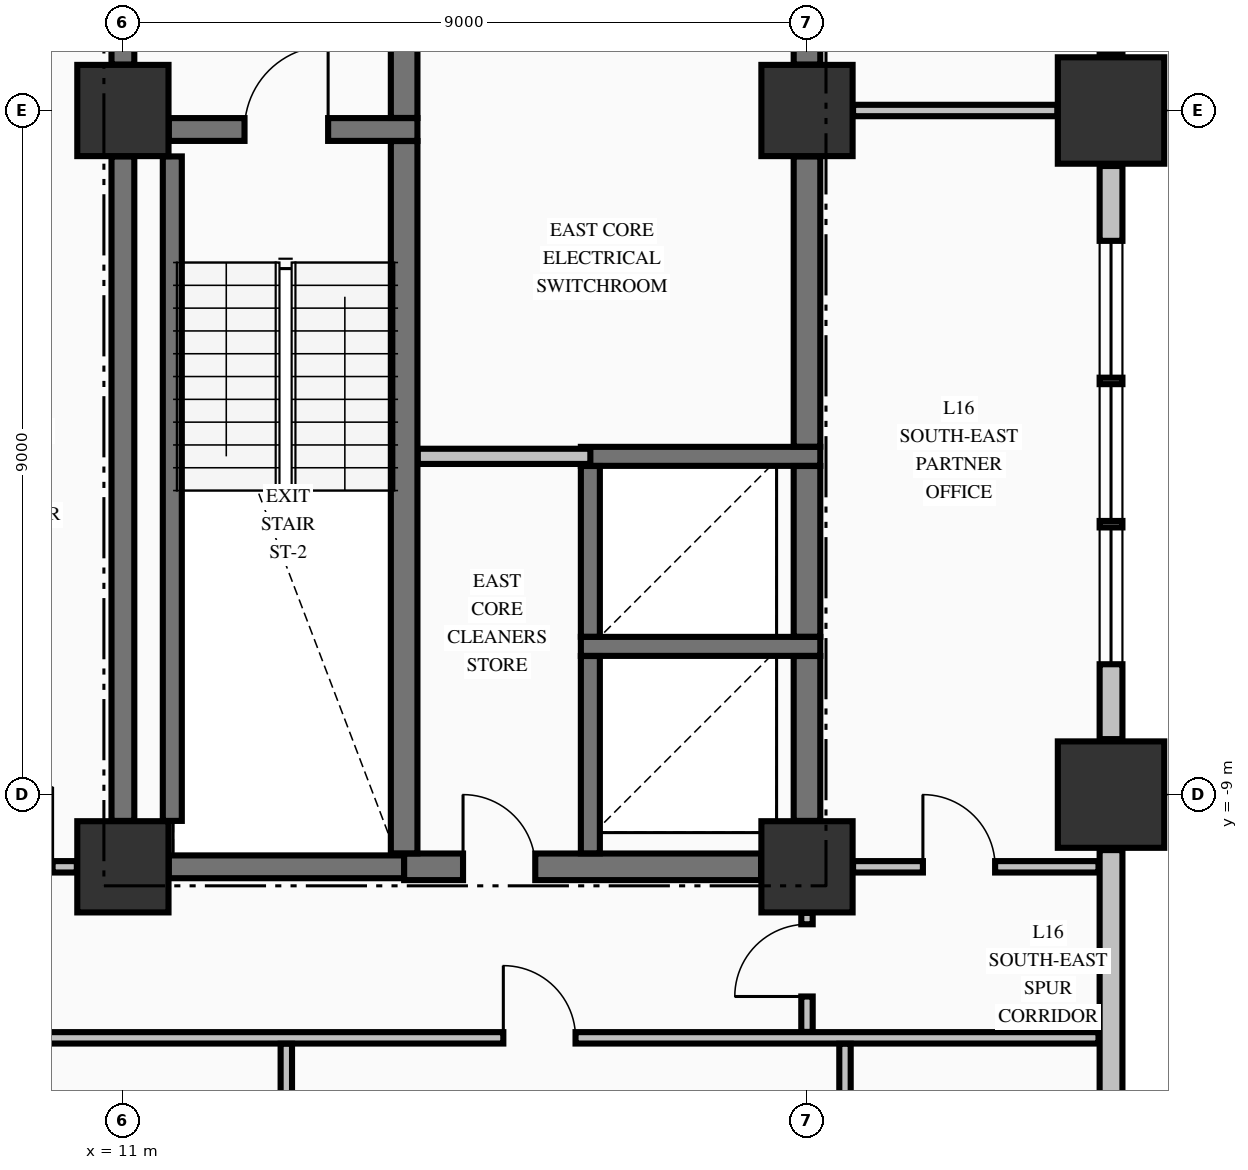
"""IFC4 building model, lengths in metres.
Left out: names, types, materials, properties, quantities, classifications, styles, units other than length and angle.
Written with IfcOpenShell. Run it as: python <this file> out.ifc"""

import sys

from ifc_helpers import new_model, si_unit, direction, frame, frame_2d, origin, origin_2d, place, context, subcontext, project, spatial, rectangle, extrude, element, fill, save


model = new_model("IFC4")
c1 = context("Model", 3, precision=1e-05, world=origin(), true_north=direction((0.0, 1.0)))
c2 = subcontext(c1, "Body", "Model", "MODEL_VIEW")
j1 = project(units=[si_unit("LENGTHUNIT", "METRE"), si_unit("PLANEANGLEUNIT", "RADIAN")], contexts=[c1])
p1 = place(None, origin())
s1 = spatial("IfcSite", under=j1, at=p1, CompositionType="ELEMENT")
p2 = place(p1, origin())
s2 = spatial("IfcBuilding", under=s1, at=p2, CompositionType="ELEMENT")
p3 = place(p2, frame((0.0, 0.0, 67.9)))
s3 = spatial("IfcBuildingStorey", under=s2, at=p3, CompositionType="ELEMENT", Elevation=67.9)
for number, where, z_axis, x_axis in (
    (1, (24.0, -9.0, -0.25), (0.0, 0.0, 1.0), (1.0, 0.0, 0.0)),
    (2, (24.0, 0.0, -0.25), (0.0, 0.0, 1.0), (1.0, 0.0, 0.0)),
):
    element("IfcColumn", number, at=place(p3, frame(where, z_axis=z_axis, x_axis=x_axis)), inside=s3, PredefinedType="COLUMN", context=c2, shape_type="SweptSolid", body=[
        extrude(rectangle(XDim=1.4, YDim=1.4, at=origin_2d()), origin(), (0.0, 0.0, 1.0), 3.495),
    ])
for number, where, z_axis, x_axis in (
    (3, (11.0, -9.95, -0.25), (0.0, 0.0, 1.0), (1.0, 0.0, 0.0)),
    (4, (11.0, 0.0, -0.25), (0.0, 0.0, 1.0), (1.0, 0.0, 0.0)),
    (5, (20.0, -9.95, -0.25), (0.0, 0.0, 1.0), (1.0, 0.0, 0.0)),
    (6, (20.0, 0.0, -0.25), (0.0, 0.0, 1.0), (1.0, 0.0, 0.0)),
):
    element("IfcColumn", number, at=place(p3, frame(where, z_axis=z_axis, x_axis=x_axis)), inside=s3, PredefinedType="COLUMN", context=c2, shape_type="SweptSolid", body=[
        extrude(rectangle(XDim=1.2, YDim=1.2, at=origin_2d()), origin(), (0.0, 0.0, 1.0), 3.495),
    ])
p4 = place(p3, frame((24.0, -22.27, 0.0), z_axis=(0.0, 0.0, 1.0), x_axis=(0.0, 1.0, 0.0)))
e7 = element("IfcWall", 7, at=p4, inside=s3, PredefinedType="STANDARD", context=c2, shape_type="SweptSolid", body=[
    extrude(rectangle(XDim=12.54, YDim=0.3, at=frame_2d((6.27, 0.0))), origin(), (0.0, 0.0, 1.0), 2.637),
])
p5 = place(p3, frame((24.0, -8.27, 0.0), z_axis=(0.0, 0.0, 1.0), x_axis=(0.0, 1.0, 0.0)))
e8 = element("IfcWall", 8, at=p5, inside=s3, PredefinedType="STANDARD", context=c2, shape_type="SweptSolid", body=[
    extrude(rectangle(XDim=7.54, YDim=0.3, at=frame_2d((3.77, 0.0))), origin(), (0.0, 0.0, 1.0), 2.637),
])
p6 = place(p5, frame((0.985, 0.0, 0.78)))
e9 = element("IfcOpeningElement", 9, at=p6, cuts=e8, PredefinedType="OPENING", context=c2, shape_type="SweptSolid", body=[
    extrude(rectangle(XDim=1.8, YDim=1.72, at=frame_2d((0.9, 0.86))), frame((0.0, 0.16, 0.0), z_axis=(0.0, -1.0, 0.0), x_axis=(1.0, 0.0, 0.0)), (0.0, 0.0, 1.0), 0.32),
])
p7 = place(p5, frame((2.87, 0.0, 0.78)))
e10 = element("IfcOpeningElement", 10, at=p7, cuts=e8, PredefinedType="OPENING", context=c2, shape_type="SweptSolid", body=[
    extrude(rectangle(XDim=1.8, YDim=1.72, at=frame_2d((0.9, 0.86))), frame((0.0, 0.16, 0.0), z_axis=(0.0, -1.0, 0.0), x_axis=(1.0, 0.0, 0.0)), (0.0, 0.0, 1.0), 0.32),
])
p8 = place(p5, frame((4.755, 0.0, 0.78)))
e11 = element("IfcOpeningElement", 11, at=p8, cuts=e8, PredefinedType="OPENING", context=c2, shape_type="SweptSolid", body=[
    extrude(rectangle(XDim=1.8, YDim=1.72, at=frame_2d((0.9, 0.86))), frame((0.0, 0.16, 0.0), z_axis=(0.0, -1.0, 0.0), x_axis=(1.0, 0.0, 0.0)), (0.0, 0.0, 1.0), 0.32),
])
p9 = place(p3, frame((24.0, 0.73, 0.0), z_axis=(0.0, 0.0, 1.0), x_axis=(0.0, 1.0, 0.0)))
e12 = element("IfcWall", 12, at=p9, inside=s3, PredefinedType="STANDARD", context=c2, shape_type="SweptSolid", body=[
    extrude(rectangle(XDim=7.54, YDim=0.3, at=frame_2d((3.77, 0.0))), origin(), (0.0, 0.0, 1.0), 2.637),
])
p10 = place(p9, frame((0.985, 0.0, 0.78)))
e13 = element("IfcOpeningElement", 13, at=p10, cuts=e12, PredefinedType="OPENING", context=c2, shape_type="SweptSolid", body=[
    extrude(rectangle(XDim=1.8, YDim=1.72, at=frame_2d((0.9, 0.86))), frame((0.0, 0.16, 0.0), z_axis=(0.0, -1.0, 0.0), x_axis=(1.0, 0.0, 0.0)), (0.0, 0.0, 1.0), 0.32),
])
p11 = place(p9, frame((2.87, 0.0, 0.78)))
e14 = element("IfcOpeningElement", 14, at=p11, cuts=e12, PredefinedType="OPENING", context=c2, shape_type="SweptSolid", body=[
    extrude(rectangle(XDim=1.8, YDim=1.72, at=frame_2d((0.9, 0.86))), frame((0.0, 0.16, 0.0), z_axis=(0.0, -1.0, 0.0), x_axis=(1.0, 0.0, 0.0)), (0.0, 0.0, 1.0), 0.32),
])
p12 = place(p9, frame((4.755, 0.0, 0.78)))
e15 = element("IfcOpeningElement", 15, at=p12, cuts=e12, PredefinedType="OPENING", context=c2, shape_type="SweptSolid", body=[
    extrude(rectangle(XDim=1.8, YDim=1.72, at=frame_2d((0.9, 0.86))), frame((0.0, 0.16, 0.0), z_axis=(0.0, -1.0, 0.0), x_axis=(1.0, 0.0, 0.0)), (0.0, 0.0, 1.0), 0.32),
])
p13 = place(p3, frame((11.604, -9.95, 0.0), z_axis=(0.0, 0.0, 1.0), x_axis=(1.0, 0.0, 0.0)))
e16 = element("IfcWall", 16, at=p13, inside=s3, PredefinedType="SHEAR", context=c2, shape_type="SweptSolid", body=[
    extrude(rectangle(XDim=3.096, YDim=0.3, at=frame_2d((1.548, 0.0))), origin(), (0.0, 0.0, 1.0), 3.245),
])
p14 = place(p3, frame((14.7, -9.95, 0.0), z_axis=(0.0, 0.0, 1.0), x_axis=(1.0, 0.0, 0.0)))
e17 = element("IfcWall", 17, at=p14, inside=s3, PredefinedType="SHEAR", context=c2, shape_type="SweptSolid", body=[
    extrude(rectangle(XDim=4.696, YDim=0.35, at=frame_2d((2.348, 0.0))), origin(), (0.0, 0.0, 1.0), 3.245),
])
p15 = place(p14, frame((0.775, 0.0, 0.0)))
e18 = element("IfcOpeningElement", 18, at=p15, cuts=e17, PredefinedType="OPENING", context=c2, shape_type="SweptSolid", body=[
    extrude(rectangle(XDim=0.95, YDim=2.15, at=frame_2d((0.475, 1.075))), frame((0.0, 0.185, 0.0), z_axis=(0.0, -1.0, 0.0), x_axis=(1.0, 0.0, 0.0)), (0.0, 0.0, 1.0), 0.37),
])
for number, where, z_axis, x_axis in (
    (19, (17.025, -7.05, 0.0), (0.0, 0.0, 1.0), (1.0, 0.0, 0.0)),
    (20, (17.025, -4.55, 0.0), (0.0, 0.0, 1.0), (1.0, 0.0, 0.0)),
):
    element("IfcWall", number, at=place(p3, frame(where, z_axis=z_axis, x_axis=x_axis)), inside=s3, PredefinedType="SOLIDWALL", context=c2, shape_type="SweptSolid", body=[
        extrude(rectangle(XDim=3.15, YDim=0.25, at=frame_2d((1.575, 0.0))), origin(), (0.0, 0.0, 1.0), 3.245),
    ])
p16 = place(p3, frame((11.604, -0.25, 0.0), z_axis=(0.0, 0.0, 1.0), x_axis=(1.0, 0.0, 0.0)))
e21 = element("IfcWall", 21, at=p16, inside=s3, PredefinedType="SHEAR", context=c2, shape_type="SweptSolid", body=[
    extrude(rectangle(XDim=3.271, YDim=0.3, at=frame_2d((1.635, 0.0))), origin(), (0.0, 0.0, 1.0), 3.245),
])
p17 = place(p16, frame((0.996, 0.0, 0.0)))
e22 = element("IfcOpeningElement", 22, at=p17, cuts=e21, PredefinedType="OPENING", context=c2, shape_type="SweptSolid", body=[
    extrude(rectangle(XDim=1.1, YDim=2.15, at=frame_2d((0.55, 1.075))), frame((0.0, 0.16, 0.0), z_axis=(0.0, -1.0, 0.0), x_axis=(1.0, 0.0, 0.0)), (0.0, 0.0, 1.0), 0.32),
])
p18 = place(p3, frame((-28.835, -12.2, 0.0), z_axis=(0.0, 0.0, 1.0), x_axis=(1.0, 0.0, 0.0)))
e23 = element("IfcWall", 23, at=p18, inside=s3, PredefinedType="PARTITIONING", context=c2, shape_type="SweptSolid", body=[
    extrude(rectangle(XDim=52.67, YDim=0.15, at=frame_2d((26.335, 0.0))), origin(), (0.0, 0.0, 1.0), 3.245),
])
p19 = place(p18, frame((10.99, 0.0, 0.0)))
e24 = element("IfcOpeningElement", 24, at=p19, cuts=e23, PredefinedType="OPENING", context=c2, shape_type="SweptSolid", body=[
    extrude(rectangle(XDim=1.05, YDim=2.15, at=frame_2d((0.525, 1.075))), frame((0.0, 0.085, 0.0), z_axis=(0.0, -1.0, 0.0), x_axis=(1.0, 0.0, 0.0)), (0.0, 0.0, 1.0), 0.17),
])
p20 = place(p18, frame((18.86, 0.0, 0.0)))
e25 = element("IfcOpeningElement", 25, at=p20, cuts=e23, PredefinedType="OPENING", context=c2, shape_type="SweptSolid", body=[
    extrude(rectangle(XDim=0.95, YDim=2.15, at=frame_2d((0.475, 1.075))), frame((0.0, 0.085, 0.0), z_axis=(0.0, -1.0, 0.0), x_axis=(1.0, 0.0, 0.0)), (0.0, 0.0, 1.0), 0.17),
])
p21 = place(p18, frame((23.21, 0.0, 0.0)))
e26 = element("IfcOpeningElement", 26, at=p21, cuts=e23, PredefinedType="OPENING", context=c2, shape_type="SweptSolid", body=[
    extrude(rectangle(XDim=0.95, YDim=2.15, at=frame_2d((0.475, 1.075))), frame((0.0, 0.085, 0.0), z_axis=(0.0, -1.0, 0.0), x_axis=(1.0, 0.0, 0.0)), (0.0, 0.0, 1.0), 0.17),
])
p22 = place(p18, frame((27.56, 0.0, 0.0)))
e27 = element("IfcOpeningElement", 27, at=p22, cuts=e23, PredefinedType="OPENING", context=c2, shape_type="SweptSolid", body=[
    extrude(rectangle(XDim=0.95, YDim=2.15, at=frame_2d((0.475, 1.075))), frame((0.0, 0.085, 0.0), z_axis=(0.0, -1.0, 0.0), x_axis=(1.0, 0.0, 0.0)), (0.0, 0.0, 1.0), 0.17),
])
p23 = place(p18, frame((36.86, 0.0, 0.0)))
e28 = element("IfcOpeningElement", 28, at=p23, cuts=e23, PredefinedType="OPENING", context=c2, shape_type="SweptSolid", body=[
    extrude(rectangle(XDim=1.05, YDim=2.15, at=frame_2d((0.525, 1.075))), frame((0.0, 0.085, 0.0), z_axis=(0.0, -1.0, 0.0), x_axis=(1.0, 0.0, 0.0)), (0.0, 0.0, 1.0), 0.17),
])
p24 = place(p18, frame((44.84, 0.0, 0.0)))
e29 = element("IfcOpeningElement", 29, at=p24, cuts=e23, PredefinedType="OPENING", context=c2, shape_type="SweptSolid", body=[
    extrude(rectangle(XDim=0.95, YDim=2.15, at=frame_2d((0.475, 1.075))), frame((0.0, 0.085, 0.0), z_axis=(0.0, -1.0, 0.0), x_axis=(1.0, 0.0, 0.0)), (0.0, 0.0, 1.0), 0.17),
])
p25 = place(p3, frame((-10.394, -9.95, 0.0), z_axis=(0.0, 0.0, 1.0), x_axis=(1.0, 0.0, 0.0)))
e30 = element("IfcWall", 30, at=p25, inside=s3, PredefinedType="PARTITIONING", context=c2, shape_type="SweptSolid", body=[
    extrude(rectangle(XDim=20.788, YDim=0.15, at=frame_2d((10.394, 0.0))), origin(), (0.0, 0.0, 1.0), 3.245),
])
p26 = place(p25, frame((0.319, 0.0, 0.0)))
e31 = element("IfcOpeningElement", 31, at=p26, cuts=e30, PredefinedType="OPENING", context=c2, shape_type="SweptSolid", body=[
    extrude(rectangle(XDim=1.05, YDim=2.15, at=frame_2d((0.525, 1.075))), frame((0.0, 0.085, 0.0), z_axis=(0.0, -1.0, 0.0), x_axis=(1.0, 0.0, 0.0)), (0.0, 0.0, 1.0), 0.17),
])
p27 = place(p25, frame((19.419, 0.0, 0.0)))
e32 = element("IfcOpeningElement", 32, at=p27, cuts=e30, PredefinedType="OPENING", context=c2, shape_type="SweptSolid", body=[
    extrude(rectangle(XDim=1.05, YDim=2.15, at=frame_2d((0.525, 1.075))), frame((0.0, 0.085, 0.0), z_axis=(0.0, -1.0, 0.0), x_axis=(1.0, 0.0, 0.0)), (0.0, 0.0, 1.0), 0.17),
])
p28 = place(p25, frame((13.369, 0.0, 0.0)))
e33 = element("IfcOpeningElement", 33, at=p28, cuts=e30, PredefinedType="OPENING", context=c2, shape_type="SweptSolid", body=[
    extrude(rectangle(XDim=0.95, YDim=2.15, at=frame_2d((0.475, 1.075))), frame((0.0, 0.085, 0.0), z_axis=(0.0, -1.0, 0.0), x_axis=(1.0, 0.0, 0.0)), (0.0, 0.0, 1.0), 0.17),
])
p29 = place(p3, frame((20.606, -9.95, 0.0), z_axis=(0.0, 0.0, 1.0), x_axis=(1.0, 0.0, 0.0)))
e34 = element("IfcWall", 34, at=p29, inside=s3, PredefinedType="PARTITIONING", context=c2, shape_type="SweptSolid", body=[
    extrude(rectangle(XDim=3.229, YDim=0.15, at=frame_2d((1.615, 0.0))), origin(), (0.0, 0.0, 1.0), 3.245),
])
p30 = place(p29, frame((0.919, 0.0, 0.0)))
e35 = element("IfcOpeningElement", 35, at=p30, cuts=e34, PredefinedType="OPENING", context=c2, shape_type="SweptSolid", body=[
    extrude(rectangle(XDim=0.95, YDim=2.15, at=frame_2d((0.475, 1.075))), frame((0.0, 0.085, 0.0), z_axis=(0.0, -1.0, 0.0), x_axis=(1.0, 0.0, 0.0)), (0.0, 0.0, 1.0), 0.17),
])
p31 = place(p3, frame((14.878, -4.55, 0.0), z_axis=(0.0, 0.0, 1.0), x_axis=(1.0, 0.0, 0.0)))
e36 = element("IfcWall", 36, at=p31, inside=s3, PredefinedType="PARTITIONING", context=c2, shape_type="SweptSolid", body=[
    extrude(rectangle(XDim=2.272, YDim=0.2, at=frame_2d((1.136, 0.0))), origin(), (0.0, 0.0, 1.0), 3.245),
])
p32 = place(p3, frame((20.606, 0.0, 0.0), z_axis=(0.0, 0.0, 1.0), x_axis=(1.0, 0.0, 0.0)))
e37 = element("IfcWall", 37, at=p32, inside=s3, PredefinedType="PARTITIONING", context=c2, shape_type="SweptSolid", body=[
    extrude(rectangle(XDim=2.688, YDim=0.15, at=frame_2d((1.344, 0.0))), origin(), (0.0, 0.0, 1.0), 2.585),
])
p33 = place(p3, frame((11.0, -9.346, 0.0), z_axis=(0.0, 0.0, 1.0), x_axis=(0.0, 1.0, 0.0)))
e38 = element("IfcWall", 38, at=p33, inside=s3, PredefinedType="SHEAR", context=c2, shape_type="SweptSolid", body=[
    extrude(rectangle(XDim=8.742, YDim=0.3, at=frame_2d((4.371, 0.0))), origin(), (0.0, 0.0, 1.0), 3.245),
])
p34 = place(p3, frame((11.0, 0.604, 0.0), z_axis=(0.0, 0.0, 1.0), x_axis=(0.0, 1.0, 0.0)))
e39 = element("IfcWall", 39, at=p34, inside=s3, PredefinedType="SHEAR", context=c2, shape_type="SweptSolid", body=[
    extrude(rectangle(XDim=2.144, YDim=0.3, at=frame_2d((1.072, 0.0))), origin(), (0.0, 0.0, 1.0), 3.245),
])
p35 = place(p34, frame((0.496, 0.0, 0.0)))
e40 = element("IfcOpeningElement", 40, at=p35, cuts=e39, PredefinedType="OPENING", context=c2, shape_type="SweptSolid", body=[
    extrude(rectangle(XDim=1.1, YDim=2.15, at=frame_2d((0.55, 1.075))), frame((0.0, 0.16, 0.0), z_axis=(0.0, -1.0, 0.0), x_axis=(1.0, 0.0, 0.0)), (0.0, 0.0, 1.0), 0.32),
])
p36 = place(p3, frame((11.65, -9.346, 0.0), z_axis=(0.0, 0.0, 1.0), x_axis=(0.0, 1.0, 0.0)))
e41 = element("IfcWall", 41, at=p36, inside=s3, PredefinedType="SOLIDWALL", context=c2, shape_type="SweptSolid", body=[
    extrude(rectangle(XDim=8.742, YDim=0.25, at=frame_2d((4.371, 0.0))), origin(), (0.0, 0.0, 1.0), 3.245),
])
p37 = place(p3, frame((14.7, -9.773, 0.0), z_axis=(0.0, 0.0, 1.0), x_axis=(0.0, 1.0, 0.0)))
e42 = element("IfcWall", 42, at=p37, inside=s3, PredefinedType="SHEAR", context=c2, shape_type="SweptSolid", body=[
    extrude(rectangle(XDim=9.371, YDim=0.35, at=frame_2d((4.686, 0.0))), origin(), (0.0, 0.0, 1.0), 3.245),
])
p38 = place(p3, frame((14.7, -0.098, 0.0), z_axis=(0.0, 0.0, 1.0), x_axis=(0.0, 1.0, 0.0)))
e43 = element("IfcWall", 43, at=p38, inside=s3, PredefinedType="SHEAR", context=c2, shape_type="SweptSolid", body=[
    extrude(rectangle(XDim=2.846, YDim=0.35, at=frame_2d((1.423, 0.0))), origin(), (0.0, 0.0, 1.0), 3.245),
])
p39 = place(p3, frame((17.15, -9.773, 0.0), z_axis=(0.0, 0.0, 1.0), x_axis=(0.0, 1.0, 0.0)))
e44 = element("IfcWall", 44, at=p39, inside=s3, PredefinedType="SOLIDWALL", context=c2, shape_type="SweptSolid", body=[
    extrude(rectangle(XDim=2.596, YDim=0.25, at=frame_2d((1.298, 0.0))), origin(), (0.0, 0.0, 1.0), 3.245),
])
p40 = place(p3, frame((17.15, -6.923, 0.0), z_axis=(0.0, 0.0, 1.0), x_axis=(0.0, 1.0, 0.0)))
e45 = element("IfcWall", 45, at=p40, inside=s3, PredefinedType="SOLIDWALL", context=c2, shape_type="SweptSolid", body=[
    extrude(rectangle(XDim=2.246, YDim=0.25, at=frame_2d((1.123, 0.0))), origin(), (0.0, 0.0, 1.0), 3.245),
])
p41 = place(p3, frame((20.0, -9.346, 0.0), z_axis=(0.0, 0.0, 1.0), x_axis=(0.0, 1.0, 0.0)))
e46 = element("IfcWall", 46, at=p41, inside=s3, PredefinedType="SHEAR", context=c2, shape_type="SweptSolid", body=[
    extrude(rectangle(XDim=2.169, YDim=0.35, at=frame_2d((1.084, 0.0))), origin(), (0.0, 0.0, 1.0), 3.245),
])
p42 = place(p3, frame((20.0, -6.923, 0.0), z_axis=(0.0, 0.0, 1.0), x_axis=(0.0, 1.0, 0.0)))
e47 = element("IfcWall", 47, at=p42, inside=s3, PredefinedType="SHEAR", context=c2, shape_type="SweptSolid", body=[
    extrude(rectangle(XDim=2.246, YDim=0.35, at=frame_2d((1.123, 0.0))), origin(), (0.0, 0.0, 1.0), 3.245),
])
p43 = place(p3, frame((20.0, -4.423, 0.0), z_axis=(0.0, 0.0, 1.0), x_axis=(0.0, 1.0, 0.0)))
e48 = element("IfcWall", 48, at=p43, inside=s3, PredefinedType="SHEAR", context=c2, shape_type="SweptSolid", body=[
    extrude(rectangle(XDim=3.819, YDim=0.35, at=frame_2d((1.91, 0.0))), origin(), (0.0, 0.0, 1.0), 3.245),
])
p44 = place(p3, frame((20.0, 0.604, 0.0), z_axis=(0.0, 0.0, 1.0), x_axis=(0.0, 1.0, 0.0)))
e49 = element("IfcWall", 49, at=p44, inside=s3, PredefinedType="SHEAR", context=c2, shape_type="SweptSolid", body=[
    extrude(rectangle(XDim=9.292, YDim=0.35, at=frame_2d((4.646, 0.0))), origin(), (0.0, 0.0, 1.0), 3.245),
])
p45 = place(p3, frame((13.15, -26.335, 0.0), z_axis=(0.0, 0.0, 1.0), x_axis=(0.0, 1.0, 0.0)))
e50 = element("IfcWall", 50, at=p45, inside=s3, PredefinedType="PARTITIONING", context=c2, shape_type="SweptSolid", body=[
    extrude(rectangle(XDim=14.057, YDim=0.15, at=frame_2d((7.028, 0.0))), origin(), (0.0, 0.0, 1.0), 3.245),
])
p46 = place(p3, frame((20.0, -12.122, 0.0), z_axis=(0.0, 0.0, 1.0), x_axis=(0.0, 1.0, 0.0)))
e51 = element("IfcWall", 51, at=p46, inside=s3, PredefinedType="PARTITIONING", context=c2, shape_type="SweptSolid", body=[
    extrude(rectangle(XDim=1.566, YDim=0.15, at=frame_2d((0.783, 0.0))), origin(), (0.0, 0.0, 1.0), 3.245),
])
p47 = place(p46, frame((0.466, 0.0, 0.0)))
e52 = element("IfcOpeningElement", 52, at=p47, cuts=e51, PredefinedType="OPENING", context=c2, shape_type="SweptSolid", body=[
    extrude(rectangle(XDim=0.95, YDim=2.15, at=frame_2d((0.475, 1.075))), frame((0.0, 0.085, 0.0), z_axis=(0.0, -1.0, 0.0), x_axis=(1.0, 0.0, 0.0)), (0.0, 0.0, 1.0), 0.17),
])
p48 = place(p3, frame((20.5, -22.294, 0.0), z_axis=(0.0, 0.0, 1.0), x_axis=(0.0, 1.0, 0.0)))
e53 = element("IfcWall", 53, at=p48, inside=s3, PredefinedType="PARTITIONING", context=c2, shape_type="SweptSolid", body=[
    extrude(rectangle(XDim=10.016, YDim=0.15, at=frame_2d((5.008, 0.0))), origin(), (0.0, 0.0, 1.0), 3.245),
])
p49 = place(p6, origin())
e54 = element("IfcWindow", 54, at=p49, inside=s3, PartitioningType="SINGLE_PANEL", PredefinedType="WINDOW", context=c2, shape_type="SweptSolid", body=[
    extrude(rectangle(XDim=1.8, YDim=1.72, at=frame_2d((0.9, 0.86))), frame((0.0, 0.03, 0.0), z_axis=(0.0, -1.0, 0.0), x_axis=(1.0, 0.0, 0.0)), (0.0, 0.0, 1.0), 0.06),
])
fill(e9, e54)
p50 = place(p7, origin())
e55 = element("IfcWindow", 55, at=p50, inside=s3, PartitioningType="SINGLE_PANEL", PredefinedType="WINDOW", context=c2, shape_type="SweptSolid", body=[
    extrude(rectangle(XDim=1.8, YDim=1.72, at=frame_2d((0.9, 0.86))), frame((0.0, 0.03, 0.0), z_axis=(0.0, -1.0, 0.0), x_axis=(1.0, 0.0, 0.0)), (0.0, 0.0, 1.0), 0.06),
])
fill(e10, e55)
p51 = place(p8, origin())
e56 = element("IfcWindow", 56, at=p51, inside=s3, PartitioningType="SINGLE_PANEL", PredefinedType="WINDOW", context=c2, shape_type="SweptSolid", body=[
    extrude(rectangle(XDim=1.8, YDim=1.72, at=frame_2d((0.9, 0.86))), frame((0.0, 0.03, 0.0), z_axis=(0.0, -1.0, 0.0), x_axis=(1.0, 0.0, 0.0)), (0.0, 0.0, 1.0), 0.06),
])
fill(e11, e56)
p52 = place(p17, origin())
e57 = element("IfcDoor", 57, at=p52, inside=s3, OperationType="SINGLE_SWING_RIGHT", PredefinedType="DOOR", context=c2, shape_type="SweptSolid", body=[
    extrude(rectangle(XDim=1.1, YDim=2.15, at=frame_2d((0.55, 1.075))), frame((0.0, 0.025, 0.0), z_axis=(0.0, -1.0, 0.0), x_axis=(1.0, 0.0, 0.0)), (0.0, 0.0, 1.0), 0.05),
])
fill(e22, e57)
p53 = place(p15, origin())
e58 = element("IfcDoor", 58, at=p53, inside=s3, OperationType="SINGLE_SWING_LEFT", PredefinedType="DOOR", context=c2, shape_type="SweptSolid", body=[
    extrude(rectangle(XDim=0.95, YDim=2.15, at=frame_2d((0.475, 1.075))), frame((0.0, 0.025, 0.0), z_axis=(0.0, -1.0, 0.0), x_axis=(1.0, 0.0, 0.0)), (0.0, 0.0, 1.0), 0.05),
])
fill(e18, e58)
p54 = place(p24, origin())
e59 = element("IfcDoor", 59, at=p54, inside=s3, OperationType="SINGLE_SWING_LEFT", PredefinedType="DOOR", context=c2, shape_type="SweptSolid", body=[
    extrude(rectangle(XDim=0.95, YDim=2.15, at=frame_2d((0.475, 1.075))), frame((0.0, 0.025, 0.0), z_axis=(0.0, -1.0, 0.0), x_axis=(1.0, 0.0, 0.0)), (0.0, 0.0, 1.0), 0.05),
])
fill(e29, e59)
p55 = place(p47, origin())
e60 = element("IfcDoor", 60, at=p55, inside=s3, OperationType="SINGLE_SWING_LEFT", PredefinedType="DOOR", context=c2, shape_type="SweptSolid", body=[
    extrude(rectangle(XDim=0.95, YDim=2.15, at=frame_2d((0.475, 1.075))), frame((0.0, 0.025, 0.0), z_axis=(0.0, -1.0, 0.0), x_axis=(1.0, 0.0, 0.0)), (0.0, 0.0, 1.0), 0.05),
])
fill(e52, e60)
p56 = place(p30, origin())
e61 = element("IfcDoor", 61, at=p56, inside=s3, OperationType="SINGLE_SWING_LEFT", PredefinedType="DOOR", context=c2, shape_type="SweptSolid", body=[
    extrude(rectangle(XDim=0.95, YDim=2.15, at=frame_2d((0.475, 1.075))), frame((0.0, 0.025, 0.0), z_axis=(0.0, -1.0, 0.0), x_axis=(1.0, 0.0, 0.0)), (0.0, 0.0, 1.0), 0.05),
])
fill(e35, e61)
save(model, sys.argv[1])
